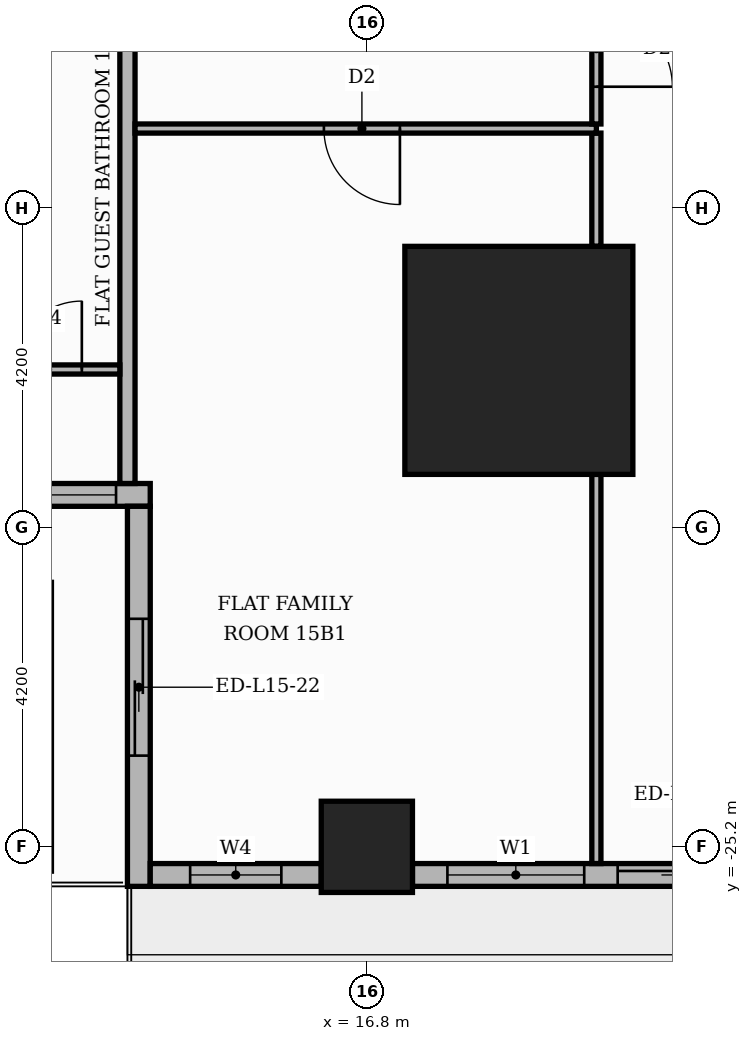
"""IFC4 building model, lengths in metres.
Left out: names, types, materials, properties, quantities, classifications, styles, units other than length and angle.
Written with IfcOpenShell. Run it as: python <this file> out.ifc"""

import sys

from ifc_helpers import new_model, si_unit, direction, frame, frame_2d, origin, origin_2d, place, context, subcontext, project, spatial, rectangle, extrude, element, fill, save


model = new_model("IFC4")
c1 = context("Model", 3, precision=1e-05, world=origin(), true_north=direction((0.0, 1.0)))
c2 = subcontext(c1, "Body", "Model", "MODEL_VIEW")
j1 = project(units=[si_unit("LENGTHUNIT", "METRE"), si_unit("PLANEANGLEUNIT", "RADIAN")], contexts=[c1])
p1 = place(None, origin())
s1 = spatial("IfcSite", under=j1, at=p1, CompositionType="ELEMENT")
p2 = place(p1, origin())
s2 = spatial("IfcBuilding", under=s1, at=p2, CompositionType="ELEMENT")
p3 = place(p2, frame((0.0, 0.0, 66.0)))
s3 = spatial("IfcBuildingStorey", under=s2, at=p3, CompositionType="ELEMENT", Elevation=66.0)
p4 = place(p3, frame((18.8, -18.8, 0.0), z_axis=(0.0, 0.0, 1.0), x_axis=(1.0, 0.0, 0.0)))
e1 = element("IfcColumn", 1, at=p4, inside=s3, PredefinedType="COLUMN", context=c2, shape_type="SweptSolid", body=[
    extrude(rectangle(XDim=3.0, YDim=3.0, at=origin_2d()), origin(), (0.0, 0.0, 1.0), 3.9),
])
p5 = place(p3, frame((16.8, -25.2, 0.0), z_axis=(0.0, 0.0, 1.0), x_axis=(1.0, 0.0, 0.0)))
e2 = element("IfcColumn", 2, at=p5, inside=s3, PredefinedType="COLUMN", context=c2, shape_type="SweptSolid", body=[
    extrude(rectangle(XDim=1.2, YDim=1.2, at=origin_2d()), origin(), (0.0, 0.0, 1.0), 3.9),
])
p6 = place(p3, frame((-13.65, -20.57, 0.0), z_axis=(0.0, 0.0, 1.0), x_axis=(1.0, 0.0, 0.0)))
e3 = element("IfcWall", 3, at=p6, inside=s3, PredefinedType="STANDARD", context=c2, shape_type="SweptSolid", body=[
    extrude(rectangle(XDim=27.6, YDim=0.3, at=frame_2d((13.8, 0.0))), origin(), (0.0, 0.0, 1.0), 3.48),
])
p7 = place(p6, frame((0.15, 0.0, 0.9)))
e4 = element("IfcOpeningElement", 4, at=p7, cuts=e3, PredefinedType="OPENING", context=c2, shape_type="SweptSolid", body=[
    extrude(rectangle(XDim=6.0, YDim=2.1, at=frame_2d((3.0, 1.05))), frame((0.0, 0.16, 0.0), z_axis=(0.0, -1.0, 0.0), x_axis=(1.0, 0.0, 0.0)), (0.0, 0.0, 1.0), 0.32),
])
p8 = place(p6, frame((6.45, 0.0, 0.9)))
e5 = element("IfcOpeningElement", 5, at=p8, cuts=e3, PredefinedType="OPENING", context=c2, shape_type="SweptSolid", body=[
    extrude(rectangle(XDim=1.8, YDim=2.1, at=frame_2d((0.9, 1.05))), frame((0.0, 0.16, 0.0), z_axis=(0.0, -1.0, 0.0), x_axis=(1.0, 0.0, 0.0)), (0.0, 0.0, 1.0), 0.32),
])
p9 = place(p6, frame((8.55, 0.0, 0.9)))
e6 = element("IfcOpeningElement", 6, at=p9, cuts=e3, PredefinedType="OPENING", context=c2, shape_type="SweptSolid", body=[
    extrude(rectangle(XDim=6.0, YDim=2.1, at=frame_2d((3.0, 1.05))), frame((0.0, 0.16, 0.0), z_axis=(0.0, -1.0, 0.0), x_axis=(1.0, 0.0, 0.0)), (0.0, 0.0, 1.0), 0.32),
])
p10 = place(p6, frame((14.85, 0.0, 0.9)))
e7 = element("IfcOpeningElement", 7, at=p10, cuts=e3, PredefinedType="OPENING", context=c2, shape_type="SweptSolid", body=[
    extrude(rectangle(XDim=6.0, YDim=2.1, at=frame_2d((3.0, 1.05))), frame((0.0, 0.16, 0.0), z_axis=(0.0, -1.0, 0.0), x_axis=(1.0, 0.0, 0.0)), (0.0, 0.0, 1.0), 0.32),
])
p11 = place(p6, frame((21.15, 0.0, 0.9)))
e8 = element("IfcOpeningElement", 8, at=p11, cuts=e3, PredefinedType="OPENING", context=c2, shape_type="SweptSolid", body=[
    extrude(rectangle(XDim=6.0, YDim=2.1, at=frame_2d((3.0, 1.05))), frame((0.0, 0.16, 0.0), z_axis=(0.0, -1.0, 0.0), x_axis=(1.0, 0.0, 0.0)), (0.0, 0.0, 1.0), 0.32),
])
p12 = place(p3, frame((13.8, -20.72, 0.0), z_axis=(0.0, 0.0, 1.0), x_axis=(0.0, -1.0, 0.0)))
e9 = element("IfcWall", 9, at=p12, inside=s3, PredefinedType="STANDARD", context=c2, shape_type="SweptSolid", body=[
    extrude(rectangle(XDim=5.0, YDim=0.3, at=frame_2d((2.5, 0.0))), origin(), (0.0, 0.0, 1.0), 3.48),
])
p13 = place(p12, frame((1.48, 0.0, 0.0)))
e10 = element("IfcOpeningElement", 10, at=p13, cuts=e9, PredefinedType="OPENING", context=c2, shape_type="SweptSolid", body=[
    extrude(rectangle(XDim=1.8, YDim=2.4, at=frame_2d((0.9, 1.2))), frame((0.0, 0.16, 0.0), z_axis=(0.0, -1.0, 0.0), x_axis=(1.0, 0.0, 0.0)), (0.0, 0.0, 1.0), 0.32),
])
p14 = place(p3, frame((13.95, -25.57, 0.0), z_axis=(0.0, 0.0, 1.0), x_axis=(1.0, 0.0, 0.0)))
e11 = element("IfcWall", 11, at=p14, inside=s3, PredefinedType="STANDARD", context=c2, shape_type="SweptSolid", body=[
    extrude(rectangle(XDim=2.25, YDim=0.3, at=frame_2d((1.125, 0.0))), origin(), (0.0, 0.0, 1.0), 3.48),
])
p15 = place(p14, frame((0.525, 0.0, 0.9)))
e12 = element("IfcOpeningElement", 12, at=p15, cuts=e11, PredefinedType="OPENING", context=c2, shape_type="SweptSolid", body=[
    extrude(rectangle(XDim=1.2, YDim=2.1, at=frame_2d((0.6, 1.05))), frame((0.0, 0.16, 0.0), z_axis=(0.0, -1.0, 0.0), x_axis=(1.0, 0.0, 0.0)), (0.0, 0.0, 1.0), 0.32),
])
p16 = place(p3, frame((17.4, -25.57, 0.0), z_axis=(0.0, 0.0, 1.0), x_axis=(1.0, 0.0, 0.0)))
e13 = element("IfcWall", 13, at=p16, inside=s3, PredefinedType="STANDARD", context=c2, shape_type="SweptSolid", body=[
    extrude(rectangle(XDim=5.32, YDim=0.3, at=frame_2d((2.66, 0.0))), origin(), (0.0, 0.0, 1.0), 3.48),
])
p17 = place(p16, frame((2.7, 0.0, 0.0)))
e14 = element("IfcOpeningElement", 14, at=p17, cuts=e13, PredefinedType="OPENING", context=c2, shape_type="SweptSolid", body=[
    extrude(rectangle(XDim=1.8, YDim=2.4, at=frame_2d((0.9, 1.2))), frame((0.0, 0.16, 0.0), z_axis=(0.0, -1.0, 0.0), x_axis=(1.0, 0.0, 0.0)), (0.0, 0.0, 1.0), 0.32),
])
p18 = place(p16, frame((0.46, 0.0, 0.9)))
e15 = element("IfcOpeningElement", 15, at=p18, cuts=e13, PredefinedType="OPENING", context=c2, shape_type="SweptSolid", body=[
    extrude(rectangle(XDim=1.8, YDim=2.1, at=frame_2d((0.9, 1.05))), frame((0.0, 0.16, 0.0), z_axis=(0.0, -1.0, 0.0), x_axis=(1.0, 0.0, 0.0)), (0.0, 0.0, 1.0), 0.32),
])
p19 = place(p3, frame((19.82, -25.42, 0.0), z_axis=(0.0, 0.0, 1.0), x_axis=(0.0, 1.0, 0.0)))
e16 = element("IfcWall", 16, at=p19, inside=s3, PredefinedType="PARTITIONING", context=c2, shape_type="SweptSolid", body=[
    extrude(rectangle(XDim=5.12, YDim=0.12, at=frame_2d((2.56, 0.0))), origin(), (0.0, 0.0, 1.0), 3.48),
])
p20 = place(p3, frame((13.65, -20.42, 0.0), z_axis=(0.0, 0.0, 1.0), x_axis=(0.0, 1.0, 0.0)))
e17 = element("IfcWall", 17, at=p20, inside=s3, PredefinedType="PARTITIONING", context=c2, shape_type="SweptSolid", body=[
    extrude(rectangle(XDim=6.67, YDim=0.2, at=frame_2d((3.335, 0.0))), origin(), (0.0, 0.0, 1.0), 3.48),
])
p21 = place(p3, frame((-1.05, -18.92, 0.0), z_axis=(0.0, 0.0, 1.0), x_axis=(1.0, 0.0, 0.0)))
e18 = element("IfcWall", 18, at=p21, inside=s3, PredefinedType="PARTITIONING", context=c2, shape_type="SweptSolid", body=[
    extrude(rectangle(XDim=14.6, YDim=0.12, at=frame_2d((7.3, 0.0))), origin(), (0.0, 0.0, 1.0), 3.48),
])
p22 = place(p21, frame((2.7, 0.0, 0.0)))
e19 = element("IfcOpeningElement", 19, at=p22, cuts=e18, PredefinedType="OPENING", context=c2, shape_type="SweptSolid", body=[
    extrude(rectangle(XDim=0.9, YDim=2.1, at=frame_2d((0.45, 1.05))), frame((0.0, 0.07, 0.0), z_axis=(0.0, -1.0, 0.0), x_axis=(1.0, 0.0, 0.0)), (0.0, 0.0, 1.0), 0.14),
])
p23 = place(p21, frame((6.85, 0.0, 0.0)))
e20 = element("IfcOpeningElement", 20, at=p23, cuts=e18, PredefinedType="OPENING", context=c2, shape_type="SweptSolid", body=[
    extrude(rectangle(XDim=1.0, YDim=2.1, at=frame_2d((0.5, 1.05))), frame((0.0, 0.07, 0.0), z_axis=(0.0, -1.0, 0.0), x_axis=(1.0, 0.0, 0.0)), (0.0, 0.0, 1.0), 0.14),
])
p24 = place(p21, frame((10.05, 0.0, 0.0)))
e21 = element("IfcOpeningElement", 21, at=p24, cuts=e18, PredefinedType="OPENING", context=c2, shape_type="SweptSolid", body=[
    extrude(rectangle(XDim=0.9, YDim=2.1, at=frame_2d((0.45, 1.05))), frame((0.0, 0.07, 0.0), z_axis=(0.0, -1.0, 0.0), x_axis=(1.0, 0.0, 0.0)), (0.0, 0.0, 1.0), 0.14),
])
p25 = place(p21, frame((13.2, 0.0, 0.0)))
e22 = element("IfcOpeningElement", 22, at=p25, cuts=e18, PredefinedType="OPENING", context=c2, shape_type="SweptSolid", body=[
    extrude(rectangle(XDim=0.9, YDim=2.1, at=frame_2d((0.45, 1.05))), frame((0.0, 0.07, 0.0), z_axis=(0.0, -1.0, 0.0), x_axis=(1.0, 0.0, 0.0)), (0.0, 0.0, 1.0), 0.14),
])
p26 = place(p3, frame((19.82, -17.3, 0.0), z_axis=(0.0, 0.0, 1.0), x_axis=(0.0, 1.0, 0.0)))
e23 = element("IfcWall", 23, at=p26, inside=s3, PredefinedType="PARTITIONING", context=c2, shape_type="SweptSolid", body=[
    extrude(rectangle(XDim=1.49, YDim=0.12, at=frame_2d((0.745, 0.0))), origin(), (0.0, 0.0, 1.0), 3.48),
])
p27 = place(p3, frame((13.75, -15.75, 0.0), z_axis=(0.0, 0.0, 1.0), x_axis=(1.0, 0.0, 0.0)))
e24 = element("IfcWall", 24, at=p27, inside=s3, PredefinedType="PARTITIONING", context=c2, shape_type="SweptSolid", body=[
    extrude(rectangle(XDim=6.07, YDim=0.12, at=frame_2d((3.035, 0.0))), origin(), (0.0, 0.0, 1.0), 3.48),
])
p28 = place(p27, frame((2.485, 0.0, 0.0)))
e25 = element("IfcOpeningElement", 25, at=p28, cuts=e24, PredefinedType="OPENING", context=c2, shape_type="SweptSolid", body=[
    extrude(rectangle(XDim=1.0, YDim=2.1, at=frame_2d((0.5, 1.05))), frame((0.0, 0.07, 0.0), z_axis=(0.0, -1.0, 0.0), x_axis=(1.0, 0.0, 0.0)), (0.0, 0.0, 1.0), 0.14),
])
p29 = place(p3, frame((19.82, -15.69, 0.0), z_axis=(0.0, 0.0, 1.0), x_axis=(0.0, 1.0, 0.0)))
e26 = element("IfcWall", 26, at=p29, inside=s3, PredefinedType="PARTITIONING", context=c2, shape_type="SweptSolid", body=[
    extrude(rectangle(XDim=1.98, YDim=0.12, at=frame_2d((0.99, 0.0))), origin(), (0.0, 0.0, 1.0), 3.48),
])
p30 = place(p29, frame((0.49, 0.0, 0.0)))
e27 = element("IfcOpeningElement", 27, at=p30, cuts=e26, PredefinedType="OPENING", context=c2, shape_type="SweptSolid", body=[
    extrude(rectangle(XDim=1.0, YDim=2.1, at=frame_2d((0.5, 1.05))), frame((0.0, 0.07, 0.0), z_axis=(0.0, -1.0, 0.0), x_axis=(1.0, 0.0, 0.0)), (0.0, 0.0, 1.0), 0.14),
])
p31 = place(p11, origin())
e28 = element("IfcWindow", 28, at=p31, inside=s3, PartitioningType="SINGLE_PANEL", PredefinedType="WINDOW", context=c2, shape_type="SweptSolid", body=[
    extrude(rectangle(XDim=6.0, YDim=2.1, at=frame_2d((3.0, 1.05))), frame((0.0, 0.03, 0.0), z_axis=(0.0, -1.0, 0.0), x_axis=(1.0, 0.0, 0.0)), (0.0, 0.0, 1.0), 0.06),
])
fill(e8, e28)
p32 = place(p13, origin())
e29 = element("IfcDoor", 29, at=p32, inside=s3, OperationType="SLIDING_TO_RIGHT", PredefinedType="DOOR", context=c2, shape_type="SweptSolid", body=[
    extrude(rectangle(XDim=1.8, YDim=2.4, at=frame_2d((0.9, 1.2))), frame((0.0, 0.025, 0.0), z_axis=(0.0, -1.0, 0.0), x_axis=(1.0, 0.0, 0.0)), (0.0, 0.0, 1.0), 0.05),
])
fill(e10, e29)
p33 = place(p15, origin())
e30 = element("IfcWindow", 30, at=p33, inside=s3, PartitioningType="SINGLE_PANEL", PredefinedType="WINDOW", context=c2, shape_type="SweptSolid", body=[
    extrude(rectangle(XDim=1.2, YDim=2.1, at=frame_2d((0.6, 1.05))), frame((0.0, 0.03, 0.0), z_axis=(0.0, -1.0, 0.0), x_axis=(1.0, 0.0, 0.0)), (0.0, 0.0, 1.0), 0.06),
])
fill(e12, e30)
p34 = place(p17, origin())
e31 = element("IfcDoor", 31, at=p34, inside=s3, OperationType="SLIDING_TO_LEFT", PredefinedType="DOOR", context=c2, shape_type="SweptSolid", body=[
    extrude(rectangle(XDim=1.8, YDim=2.4, at=frame_2d((0.9, 1.2))), frame((0.0, 0.025, 0.0), z_axis=(0.0, -1.0, 0.0), x_axis=(1.0, 0.0, 0.0)), (0.0, 0.0, 1.0), 0.05),
])
fill(e14, e31)
p35 = place(p18, origin())
e32 = element("IfcWindow", 32, at=p35, inside=s3, PartitioningType="SINGLE_PANEL", PredefinedType="WINDOW", context=c2, shape_type="SweptSolid", body=[
    extrude(rectangle(XDim=1.8, YDim=2.1, at=frame_2d((0.9, 1.05))), frame((0.0, 0.03, 0.0), z_axis=(0.0, -1.0, 0.0), x_axis=(1.0, 0.0, 0.0)), (0.0, 0.0, 1.0), 0.06),
])
fill(e15, e32)
p36 = place(p25, origin())
e33 = element("IfcDoor", 33, at=p36, inside=s3, OperationType="SINGLE_SWING_RIGHT", PredefinedType="DOOR", context=c2, shape_type="SweptSolid", body=[
    extrude(rectangle(XDim=0.9, YDim=2.1, at=frame_2d((0.45, 1.05))), frame((0.0, 0.025, 0.0), z_axis=(0.0, -1.0, 0.0), x_axis=(1.0, 0.0, 0.0)), (0.0, 0.0, 1.0), 0.05),
])
fill(e22, e33)
p37 = place(p28, frame((1.0, 0.0, 0.0), z_axis=(0.0, 0.0, 1.0), x_axis=(-1.0, 0.0, 0.0)))
e34 = element("IfcDoor", 34, at=p37, inside=s3, OperationType="SINGLE_SWING_RIGHT", PredefinedType="DOOR", context=c2, shape_type="SweptSolid", body=[
    extrude(rectangle(XDim=1.0, YDim=2.1, at=frame_2d((0.5, 1.05))), frame((0.0, 0.025, 0.0), z_axis=(0.0, -1.0, 0.0), x_axis=(1.0, 0.0, 0.0)), (0.0, 0.0, 1.0), 0.05),
])
fill(e25, e34)
p38 = place(p30, frame((1.0, 0.0, 0.0), z_axis=(0.0, 0.0, 1.0), x_axis=(-1.0, 0.0, 0.0)))
e35 = element("IfcDoor", 35, at=p38, inside=s3, OperationType="SINGLE_SWING_LEFT", PredefinedType="DOOR", context=c2, shape_type="SweptSolid", body=[
    extrude(rectangle(XDim=1.0, YDim=2.1, at=frame_2d((0.5, 1.05))), frame((0.0, 0.025, 0.0), z_axis=(0.0, -1.0, 0.0), x_axis=(1.0, 0.0, 0.0)), (0.0, 0.0, 1.0), 0.05),
])
fill(e27, e35)
save(model, sys.argv[1])
